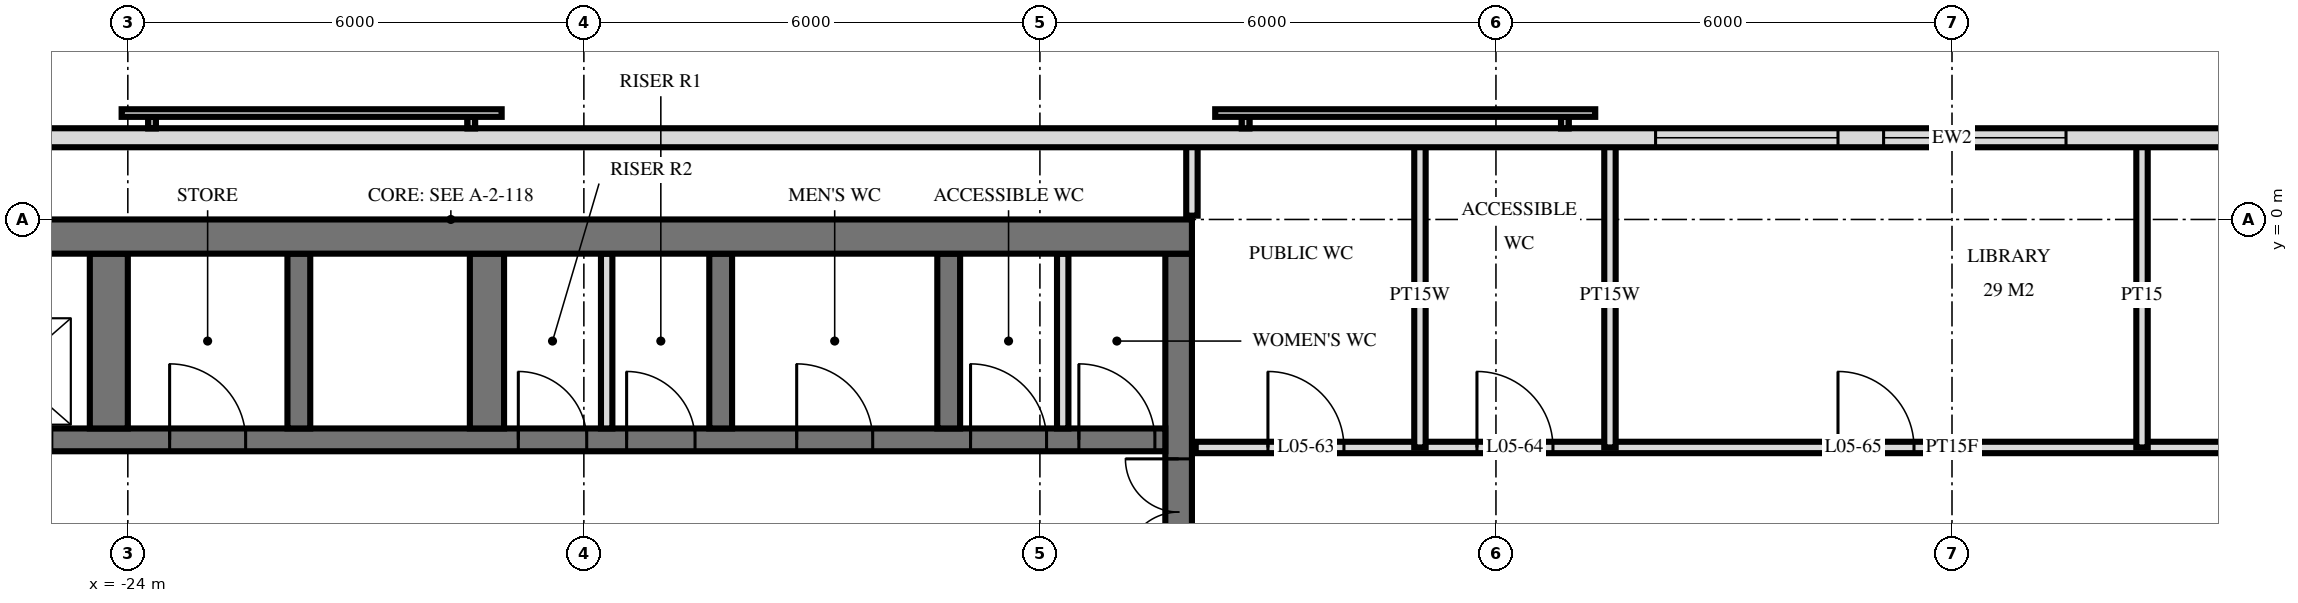
"""IFC4 building model, lengths in metres.
Left out: names, types, materials, properties, quantities, classifications, styles, units other than length and angle.
Written with IfcOpenShell. Run it as: python <this file> out.ifc"""

import sys

from ifc_helpers import new_model, si_unit, direction, frame, frame_2d, origin, place, context, subcontext, project, spatial, rectangle, extrude, element, fill, save


model = new_model("IFC4")
c1 = context("Model", 3, precision=1e-05, world=origin(), true_north=direction((0.0, 1.0)))
c2 = subcontext(c1, "Body", "Model", "MODEL_VIEW")
j1 = project(units=[si_unit("LENGTHUNIT", "METRE"), si_unit("PLANEANGLEUNIT", "RADIAN")], contexts=[c1])
p1 = place(None, origin())
s1 = spatial("IfcSite", under=j1, at=p1, CompositionType="ELEMENT")
p2 = place(p1, origin())
s2 = spatial("IfcBuilding", under=s1, at=p2, CompositionType="ELEMENT")
p3 = place(p2, frame((0.0, 0.0, 27.6)))
s3 = spatial("IfcBuildingStorey", under=s2, at=p3, CompositionType="ELEMENT", Elevation=27.6)
p4 = place(p3, frame((-29.5, -0.225, 0.0), z_axis=(0.0, 0.0, 1.0), x_axis=(1.0, 0.0, 0.0)))
e1 = element("IfcWall", 1, at=p4, inside=s3, PredefinedType="SHEAR", context=c2, shape_type="SweptSolid", body=[
    extrude(rectangle(XDim=19.5, YDim=0.45, at=frame_2d((9.75, 0.0))), origin(), (0.0, 0.0, 1.0), 3.6),
])
p5 = place(p3, frame((-10.175, -14.55, 0.0), z_axis=(0.0, 0.0, 1.0), x_axis=(0.0, 1.0, 0.0)))
e2 = element("IfcWall", 2, at=p5, inside=s3, PredefinedType="SHEAR", context=c2, shape_type="SweptSolid", body=[
    extrude(rectangle(XDim=14.1, YDim=0.35, at=frame_2d((7.05, 0.0))), origin(), (0.0, 0.0, 1.0), 3.6),
])
p6 = place(p5, frame((8.4, 0.0, 0.0)))
e3 = element("IfcOpeningElement", 3, at=p6, cuts=e2, PredefinedType="OPENING", context=c2, shape_type="SweptSolid", body=[
    extrude(rectangle(XDim=1.4, YDim=2.4, at=frame_2d((0.7, 1.2))), frame((0.0, 0.185, 0.0), z_axis=(0.0, -1.0, 0.0), x_axis=(1.0, 0.0, 0.0)), (0.0, 0.0, 1.0), 0.37),
])
p7 = place(p5, frame((10.0, 0.0, 0.0)))
e4 = element("IfcOpeningElement", 4, at=p7, cuts=e2, PredefinedType="OPENING", context=c2, shape_type="SweptSolid", body=[
    extrude(rectangle(XDim=1.4, YDim=2.4, at=frame_2d((0.7, 1.2))), frame((0.0, 0.185, 0.0), z_axis=(0.0, -1.0, 0.0), x_axis=(1.0, 0.0, 0.0)), (0.0, 0.0, 1.0), 0.37),
])
p8 = place(p5, frame((4.0, 0.0, 0.0)))
e5 = element("IfcOpeningElement", 5, at=p8, cuts=e2, PredefinedType="OPENING", context=c2, shape_type="SweptSolid", body=[
    extrude(rectangle(XDim=1.2, YDim=2.1, at=frame_2d((0.6, 1.05))), frame((0.0, 0.185, 0.0), z_axis=(0.0, -1.0, 0.0), x_axis=(1.0, 0.0, 0.0)), (0.0, 0.0, 1.0), 0.37),
])
p9 = place(p3, frame((-29.05, -2.9, 0.0), z_axis=(0.0, 0.0, 1.0), x_axis=(1.0, 0.0, 0.0)))
e6 = element("IfcWall", 6, at=p9, inside=s3, PredefinedType="SHEAR", context=c2, shape_type="SweptSolid", body=[
    extrude(rectangle(XDim=18.7, YDim=0.3, at=frame_2d((9.35, 0.0))), origin(), (0.0, 0.0, 1.0), 3.6),
])
p10 = place(p9, frame((2.95, 0.0, 0.0)))
e7 = element("IfcOpeningElement", 7, at=p10, cuts=e6, PredefinedType="OPENING", context=c2, shape_type="SweptSolid", body=[
    extrude(rectangle(XDim=1.1, YDim=2.1, at=frame_2d((0.55, 1.05))), frame((0.0, 0.16, 0.0), z_axis=(0.0, -1.0, 0.0), x_axis=(1.0, 0.0, 0.0)), (0.0, 0.0, 1.0), 0.32),
])
p11 = place(p9, frame((0.55, 0.0, 0.0)))
e8 = element("IfcOpeningElement", 8, at=p11, cuts=e6, PredefinedType="OPENING", context=c2, shape_type="SweptSolid", body=[
    extrude(rectangle(XDim=1.1, YDim=2.1, at=frame_2d((0.55, 1.05))), frame((0.0, 0.16, 0.0), z_axis=(0.0, -1.0, 0.0), x_axis=(1.0, 0.0, 0.0)), (0.0, 0.0, 1.0), 0.32),
])
p12 = place(p9, frame((11.613, 0.0, 0.0)))
e9 = element("IfcOpeningElement", 9, at=p12, cuts=e6, PredefinedType="OPENING", context=c2, shape_type="SweptSolid", body=[
    extrude(rectangle(XDim=0.9, YDim=2.1, at=frame_2d((0.45, 1.05))), frame((0.0, 0.16, 0.0), z_axis=(0.0, -1.0, 0.0), x_axis=(1.0, 0.0, 0.0)), (0.0, 0.0, 1.0), 0.32),
])
p13 = place(p9, frame((10.188, 0.0, 0.0)))
e10 = element("IfcOpeningElement", 10, at=p13, cuts=e6, PredefinedType="OPENING", context=c2, shape_type="SweptSolid", body=[
    extrude(rectangle(XDim=0.9, YDim=2.1, at=frame_2d((0.45, 1.05))), frame((0.0, 0.16, 0.0), z_axis=(0.0, -1.0, 0.0), x_axis=(1.0, 0.0, 0.0)), (0.0, 0.0, 1.0), 0.32),
])
p14 = place(p9, frame((17.562, 0.0, 0.0)))
e11 = element("IfcOpeningElement", 11, at=p14, cuts=e6, PredefinedType="OPENING", context=c2, shape_type="SweptSolid", body=[
    extrude(rectangle(XDim=1.0, YDim=2.1, at=frame_2d((0.5, 1.05))), frame((0.0, 0.16, 0.0), z_axis=(0.0, -1.0, 0.0), x_axis=(1.0, 0.0, 0.0)), (0.0, 0.0, 1.0), 0.32),
])
p15 = place(p9, frame((16.137, 0.0, 0.0)))
e12 = element("IfcOpeningElement", 12, at=p15, cuts=e6, PredefinedType="OPENING", context=c2, shape_type="SweptSolid", body=[
    extrude(rectangle(XDim=1.0, YDim=2.1, at=frame_2d((0.5, 1.05))), frame((0.0, 0.16, 0.0), z_axis=(0.0, -1.0, 0.0), x_axis=(1.0, 0.0, 0.0)), (0.0, 0.0, 1.0), 0.32),
])
p16 = place(p9, frame((13.85, 0.0, 0.0)))
e13 = element("IfcOpeningElement", 13, at=p16, cuts=e6, PredefinedType="OPENING", context=c2, shape_type="SweptSolid", body=[
    extrude(rectangle(XDim=1.0, YDim=2.1, at=frame_2d((0.5, 1.05))), frame((0.0, 0.16, 0.0), z_axis=(0.0, -1.0, 0.0), x_axis=(1.0, 0.0, 0.0)), (0.0, 0.0, 1.0), 0.32),
])
p17 = place(p9, frame((5.6, 0.0, 0.0)))
e14 = element("IfcOpeningElement", 14, at=p17, cuts=e6, PredefinedType="OPENING", context=c2, shape_type="SweptSolid", body=[
    extrude(rectangle(XDim=1.0, YDim=2.1, at=frame_2d((0.5, 1.05))), frame((0.0, 0.16, 0.0), z_axis=(0.0, -1.0, 0.0), x_axis=(1.0, 0.0, 0.0)), (0.0, 0.0, 1.0), 0.32),
])
for number, where, z_axis, x_axis in (
    (15, (-13.2, -2.75, 0.0), (0.0, 0.0, 1.0), (0.0, 1.0, 0.0)),
    (16, (-16.2, -2.75, 0.0), (0.0, 0.0, 1.0), (0.0, 1.0, 0.0)),
):
    element("IfcWall", number, at=place(p3, frame(where, z_axis=z_axis, x_axis=x_axis)), inside=s3, PredefinedType="SHEAR", context=c2, shape_type="SweptSolid", body=[
        extrude(rectangle(XDim=2.3, YDim=0.3, at=frame_2d((1.15, 0.0))), origin(), (0.0, 0.0, 1.0), 3.6),
    ])
p18 = place(p3, frame((-19.275, -2.75, 0.0), z_axis=(0.0, 0.0, 1.0), x_axis=(0.0, 1.0, 0.0)))
e17 = element("IfcWall", 17, at=p18, inside=s3, PredefinedType="SHEAR", context=c2, shape_type="SweptSolid", body=[
    extrude(rectangle(XDim=2.3, YDim=0.45, at=frame_2d((1.15, 0.0))), origin(), (0.0, 0.0, 1.0), 3.6),
])
p19 = place(p3, frame((-21.75, -2.75, 0.0), z_axis=(0.0, 0.0, 1.0), x_axis=(0.0, 1.0, 0.0)))
e18 = element("IfcWall", 18, at=p19, inside=s3, PredefinedType="SHEAR", context=c2, shape_type="SweptSolid", body=[
    extrude(rectangle(XDim=2.3, YDim=0.3, at=frame_2d((1.15, 0.0))), origin(), (0.0, 0.0, 1.0), 3.6),
])
p20 = place(p3, frame((-24.25, -2.75, 0.0), z_axis=(0.0, 0.0, 1.0), x_axis=(0.0, 1.0, 0.0)))
e19 = element("IfcWall", 19, at=p20, inside=s3, PredefinedType="SHEAR", context=c2, shape_type="SweptSolid", body=[
    extrude(rectangle(XDim=2.3, YDim=0.5, at=frame_2d((1.15, 0.0))), origin(), (0.0, 0.0, 1.0), 3.6),
])
p21 = place(p3, frame((28.775, 1.075, 0.0), z_axis=(0.0, 0.0, 1.0), x_axis=(-1.0, 0.0, 0.0)))
e20 = element("IfcWall", 20, at=p21, inside=s3, PredefinedType="SOLIDWALL", context=c2, shape_type="SweptSolid", body=[
    extrude(rectangle(XDim=57.551, YDim=0.25, at=frame_2d((28.775, 0.0))), origin(), (0.0, 0.0, 1.0), 3.32),
])
p22 = place(p21, frame((21.275, 0.0, 0.3)))
e21 = element("IfcOpeningElement", 21, at=p22, cuts=e20, PredefinedType="OPENING", context=c2, shape_type="SweptSolid", body=[
    extrude(rectangle(XDim=2.4, YDim=2.1, at=frame_2d((1.2, 1.05))), frame((0.0, 0.135, 0.0), z_axis=(0.0, -1.0, 0.0), x_axis=(1.0, 0.0, 0.0)), (0.0, 0.0, 1.0), 0.27),
])
p23 = place(p21, frame((27.275, 0.0, 0.3)))
e22 = element("IfcOpeningElement", 22, at=p23, cuts=e20, PredefinedType="OPENING", context=c2, shape_type="SweptSolid", body=[
    extrude(rectangle(XDim=2.4, YDim=2.1, at=frame_2d((1.2, 1.05))), frame((0.0, 0.135, 0.0), z_axis=(0.0, -1.0, 0.0), x_axis=(1.0, 0.0, 0.0)), (0.0, 0.0, 1.0), 0.27),
])
p24 = place(p21, frame((30.275, 0.0, 0.3)))
e23 = element("IfcOpeningElement", 23, at=p24, cuts=e20, PredefinedType="OPENING", context=c2, shape_type="SweptSolid", body=[
    extrude(rectangle(XDim=2.4, YDim=2.1, at=frame_2d((1.2, 1.05))), frame((0.0, 0.135, 0.0), z_axis=(0.0, -1.0, 0.0), x_axis=(1.0, 0.0, 0.0)), (0.0, 0.0, 1.0), 0.27),
])
for number, where, z_axis, x_axis in (
    (24, (-17.7, -2.75, 0.0), (0.0, 0.0, 1.0), (0.0, 1.0, 0.0)),
    (25, (-11.7, -2.75, 0.0), (0.0, 0.0, 1.0), (0.0, 1.0, 0.0)),
):
    element("IfcWall", number, at=place(p3, frame(where, z_axis=z_axis, x_axis=x_axis)), inside=s3, PredefinedType="PARTITIONING", context=c2, shape_type="SweptSolid", body=[
        extrude(rectangle(XDim=2.3, YDim=0.15, at=frame_2d((1.15, 0.0))), origin(), (0.0, 0.0, 1.0), 3.3),
    ])
p25 = place(p3, frame((2.5, -3.0, 0.0), z_axis=(0.0, 0.0, 1.0), x_axis=(0.0, 1.0, 0.0)))
e26 = element("IfcWall", 26, at=p25, inside=s3, PredefinedType="PARTITIONING", context=c2, shape_type="SweptSolid", body=[
    extrude(rectangle(XDim=4.02, YDim=0.15, at=frame_2d((2.01, 0.0))), origin(), (0.0, 0.0, 1.0), 3.32),
])
for number, where, z_axis, x_axis in (
    (27, (-4.5, -3.0, 0.0), (0.0, 0.0, 1.0), (0.0, 1.0, 0.0)),
    (28, (-7.0, -3.0, 0.0), (0.0, 0.0, 1.0), (0.0, 1.0, 0.0)),
):
    element("IfcWall", number, at=place(p3, frame(where, z_axis=z_axis, x_axis=x_axis)), inside=s3, PredefinedType="PLUMBINGWALL", context=c2, shape_type="SweptSolid", body=[
        extrude(rectangle(XDim=4.02, YDim=0.15, at=frame_2d((2.01, 0.0))), origin(), (0.0, 0.0, 1.0), 3.32),
    ])
p26 = place(p3, frame((-10.0, 0.05, 0.0), z_axis=(0.0, 0.0, 1.0), x_axis=(0.0, 1.0, 0.0)))
e29 = element("IfcWall", 29, at=p26, inside=s3, PredefinedType="PLUMBINGWALL", context=c2, shape_type="SweptSolid", body=[
    extrude(rectangle(XDim=0.97, YDim=0.15, at=frame_2d((0.485, 0.0))), origin(), (0.0, 0.0, 1.0), 3.32),
])
p27 = place(p3, frame((-9.95, -3.0, 0.0), z_axis=(0.0, 0.0, 1.0), x_axis=(1.0, 0.0, 0.0)))
e30 = element("IfcWall", 30, at=p27, inside=s3, PredefinedType="PARTITIONING", context=c2, shape_type="SweptSolid", body=[
    extrude(rectangle(XDim=19.9, YDim=0.15, at=frame_2d((9.95, 0.0))), origin(), (0.0, 0.0, 1.0), 3.32),
])
p28 = place(p27, frame((0.95, 0.0, 0.0)))
e31 = element("IfcOpeningElement", 31, at=p28, cuts=e30, PredefinedType="OPENING", context=c2, shape_type="SweptSolid", body=[
    extrude(rectangle(XDim=1.0, YDim=2.1, at=frame_2d((0.5, 1.05))), frame((0.0, 0.085, 0.0), z_axis=(0.0, -1.0, 0.0), x_axis=(1.0, 0.0, 0.0)), (0.0, 0.0, 1.0), 0.17),
])
p29 = place(p27, frame((3.7, 0.0, 0.0)))
e32 = element("IfcOpeningElement", 32, at=p29, cuts=e30, PredefinedType="OPENING", context=c2, shape_type="SweptSolid", body=[
    extrude(rectangle(XDim=1.0, YDim=2.1, at=frame_2d((0.5, 1.05))), frame((0.0, 0.085, 0.0), z_axis=(0.0, -1.0, 0.0), x_axis=(1.0, 0.0, 0.0)), (0.0, 0.0, 1.0), 0.17),
])
p30 = place(p27, frame((8.45, 0.0, 0.0)))
e33 = element("IfcOpeningElement", 33, at=p30, cuts=e30, PredefinedType="OPENING", context=c2, shape_type="SweptSolid", body=[
    extrude(rectangle(XDim=1.0, YDim=2.1, at=frame_2d((0.5, 1.05))), frame((0.0, 0.085, 0.0), z_axis=(0.0, -1.0, 0.0), x_axis=(1.0, 0.0, 0.0)), (0.0, 0.0, 1.0), 0.17),
])
p31 = place(p27, frame((15.7, 0.0, 0.0)))
e34 = element("IfcOpeningElement", 34, at=p31, cuts=e30, PredefinedType="OPENING", context=c2, shape_type="SweptSolid", body=[
    extrude(rectangle(XDim=1.0, YDim=2.1, at=frame_2d((0.5, 1.05))), frame((0.0, 0.085, 0.0), z_axis=(0.0, -1.0, 0.0), x_axis=(1.0, 0.0, 0.0)), (0.0, 0.0, 1.0), 0.17),
])
p32 = place(p23, origin())
e35 = element("IfcWindow", 35, at=p32, inside=s3, PartitioningType="SINGLE_PANEL", PredefinedType="WINDOW", context=c2, shape_type="SweptSolid", body=[
    extrude(rectangle(XDim=2.4, YDim=2.1, at=frame_2d((1.2, 1.05))), frame((0.0, 0.03, 0.0), z_axis=(0.0, -1.0, 0.0), x_axis=(1.0, 0.0, 0.0)), (0.0, 0.0, 1.0), 0.06),
])
fill(e22, e35)
p33 = place(p24, origin())
e36 = element("IfcWindow", 36, at=p33, inside=s3, PartitioningType="SINGLE_PANEL", PredefinedType="WINDOW", context=c2, shape_type="SweptSolid", body=[
    extrude(rectangle(XDim=2.4, YDim=2.1, at=frame_2d((1.2, 1.05))), frame((0.0, 0.03, 0.0), z_axis=(0.0, -1.0, 0.0), x_axis=(1.0, 0.0, 0.0)), (0.0, 0.0, 1.0), 0.06),
])
fill(e23, e36)
p34 = place(p7, origin())
e37 = element("IfcDoor", 37, at=p34, inside=s3, OperationType="DOUBLE_DOOR_SINGLE_SWING", PredefinedType="DOOR", context=c2, shape_type="SweptSolid", body=[
    extrude(rectangle(XDim=1.4, YDim=2.4, at=frame_2d((0.7, 1.2))), frame((0.0, 0.025, 0.0), z_axis=(0.0, -1.0, 0.0), x_axis=(1.0, 0.0, 0.0)), (0.0, 0.0, 1.0), 0.05),
])
fill(e4, e37)
p35 = place(p12, origin())
e38 = element("IfcDoor", 38, at=p35, inside=s3, OperationType="SINGLE_SWING_RIGHT", PredefinedType="DOOR", context=c2, shape_type="SweptSolid", body=[
    extrude(rectangle(XDim=0.9, YDim=2.1, at=frame_2d((0.45, 1.05))), frame((0.0, 0.025, 0.0), z_axis=(0.0, -1.0, 0.0), x_axis=(1.0, 0.0, 0.0)), (0.0, 0.0, 1.0), 0.05),
])
fill(e9, e38)
p36 = place(p13, origin())
e39 = element("IfcDoor", 39, at=p36, inside=s3, OperationType="SINGLE_SWING_RIGHT", PredefinedType="DOOR", context=c2, shape_type="SweptSolid", body=[
    extrude(rectangle(XDim=0.9, YDim=2.1, at=frame_2d((0.45, 1.05))), frame((0.0, 0.025, 0.0), z_axis=(0.0, -1.0, 0.0), x_axis=(1.0, 0.0, 0.0)), (0.0, 0.0, 1.0), 0.05),
])
fill(e10, e39)
p37 = place(p14, origin())
e40 = element("IfcDoor", 40, at=p37, inside=s3, OperationType="SINGLE_SWING_RIGHT", PredefinedType="DOOR", context=c2, shape_type="SweptSolid", body=[
    extrude(rectangle(XDim=1.0, YDim=2.1, at=frame_2d((0.5, 1.05))), frame((0.0, 0.025, 0.0), z_axis=(0.0, -1.0, 0.0), x_axis=(1.0, 0.0, 0.0)), (0.0, 0.0, 1.0), 0.05),
])
fill(e11, e40)
p38 = place(p15, origin())
e41 = element("IfcDoor", 41, at=p38, inside=s3, OperationType="SINGLE_SWING_RIGHT", PredefinedType="DOOR", context=c2, shape_type="SweptSolid", body=[
    extrude(rectangle(XDim=1.0, YDim=2.1, at=frame_2d((0.5, 1.05))), frame((0.0, 0.025, 0.0), z_axis=(0.0, -1.0, 0.0), x_axis=(1.0, 0.0, 0.0)), (0.0, 0.0, 1.0), 0.05),
])
fill(e12, e41)
p39 = place(p16, origin())
e42 = element("IfcDoor", 42, at=p39, inside=s3, OperationType="SINGLE_SWING_RIGHT", PredefinedType="DOOR", context=c2, shape_type="SweptSolid", body=[
    extrude(rectangle(XDim=1.0, YDim=2.1, at=frame_2d((0.5, 1.05))), frame((0.0, 0.025, 0.0), z_axis=(0.0, -1.0, 0.0), x_axis=(1.0, 0.0, 0.0)), (0.0, 0.0, 1.0), 0.05),
])
fill(e13, e42)
p40 = place(p17, origin())
e43 = element("IfcDoor", 43, at=p40, inside=s3, OperationType="SINGLE_SWING_RIGHT", PredefinedType="DOOR", context=c2, shape_type="SweptSolid", body=[
    extrude(rectangle(XDim=1.0, YDim=2.1, at=frame_2d((0.5, 1.05))), frame((0.0, 0.025, 0.0), z_axis=(0.0, -1.0, 0.0), x_axis=(1.0, 0.0, 0.0)), (0.0, 0.0, 1.0), 0.05),
])
fill(e14, e43)
p41 = place(p28, origin())
e44 = element("IfcDoor", 44, at=p41, inside=s3, OperationType="SINGLE_SWING_RIGHT", PredefinedType="DOOR", context=c2, shape_type="SweptSolid", body=[
    extrude(rectangle(XDim=1.0, YDim=2.1, at=frame_2d((0.5, 1.05))), frame((0.0, 0.025, 0.0), z_axis=(0.0, -1.0, 0.0), x_axis=(1.0, 0.0, 0.0)), (0.0, 0.0, 1.0), 0.05),
])
fill(e31, e44)
p42 = place(p29, origin())
e45 = element("IfcDoor", 45, at=p42, inside=s3, OperationType="SINGLE_SWING_RIGHT", PredefinedType="DOOR", context=c2, shape_type="SweptSolid", body=[
    extrude(rectangle(XDim=1.0, YDim=2.1, at=frame_2d((0.5, 1.05))), frame((0.0, 0.025, 0.0), z_axis=(0.0, -1.0, 0.0), x_axis=(1.0, 0.0, 0.0)), (0.0, 0.0, 1.0), 0.05),
])
fill(e32, e45)
p43 = place(p30, origin())
e46 = element("IfcDoor", 46, at=p43, inside=s3, OperationType="SINGLE_SWING_RIGHT", PredefinedType="DOOR", context=c2, shape_type="SweptSolid", body=[
    extrude(rectangle(XDim=1.0, YDim=2.1, at=frame_2d((0.5, 1.05))), frame((0.0, 0.025, 0.0), z_axis=(0.0, -1.0, 0.0), x_axis=(1.0, 0.0, 0.0)), (0.0, 0.0, 1.0), 0.05),
])
fill(e33, e46)
save(model, sys.argv[1])
